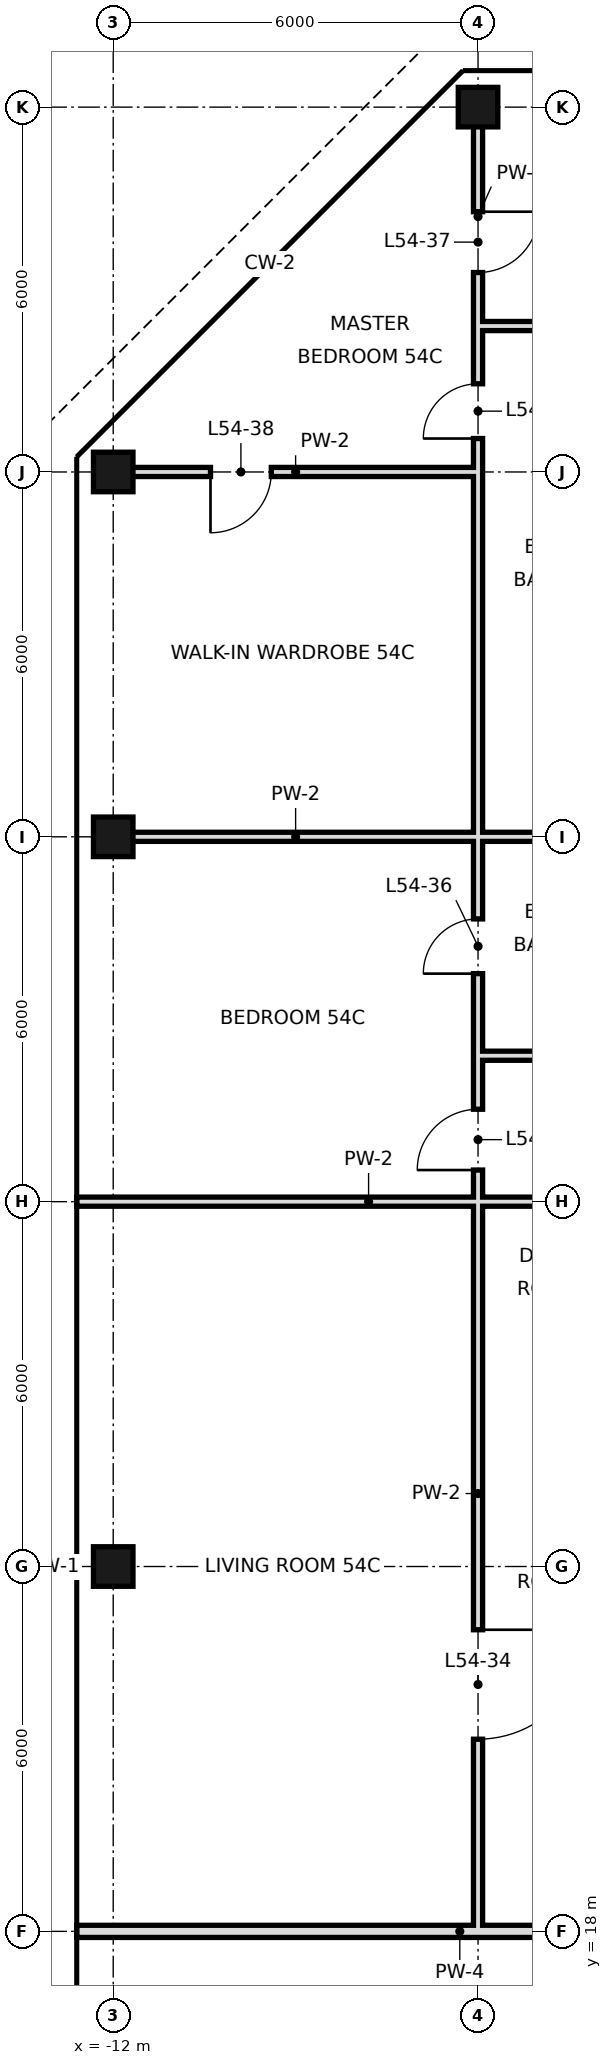
"""IFC4 building model, lengths in metres.
Left out: names, types, materials, properties, quantities, classifications, styles, units other than length and angle.
Written with IfcOpenShell. Run it as: python <this file> out.ifc"""

import sys

from ifc_helpers import new_model, si_unit, direction, frame, frame_2d, origin, origin_2d, place, context, subcontext, project, spatial, rectangle, hollow_rectangle, extrude, element, fill, save


model = new_model("IFC4")
c1 = context("Model", 3, precision=1e-05, world=origin(), true_north=direction((0.0, 1.0)))
c2 = subcontext(c1, "Body", "Model", "MODEL_VIEW")
j1 = project(units=[si_unit("LENGTHUNIT", "METRE"), si_unit("PLANEANGLEUNIT", "RADIAN")], contexts=[c1])
p1 = place(None, origin())
s1 = spatial("IfcSite", under=j1, at=p1, CompositionType="ELEMENT")
p2 = place(p1, origin())
s2 = spatial("IfcBuilding", under=s1, at=p2, CompositionType="ELEMENT")
p3 = place(p2, frame((0.0, 0.0, 229.8)))
s3 = spatial("IfcBuildingStorey", under=s2, at=p3, CompositionType="ELEMENT", Elevation=229.8)
for number, where, z_axis, x_axis in (
    (1, (-12.0, 24.0, 0.0), (0.0, 0.0, 1.0), (1.0, 0.0, 0.0)),
    (2, (-12.0, 36.0, 0.0), (0.0, 0.0, 1.0), (1.0, 0.0, 0.0)),
    (3, (-12.0, 42.0, 0.0), (0.0, 0.0, 1.0), (1.0, 0.0, 0.0)),
    (4, (-6.0, 48.0, 0.0), (0.0, 0.0, 1.0), (1.0, 0.0, 0.0)),
):
    element("IfcColumn", number, at=place(p3, frame(where, z_axis=z_axis, x_axis=x_axis)), inside=s3, PredefinedType="COLUMN", context=c2, shape_type="SweptSolid", body=[
        extrude(hollow_rectangle(XDim=0.65, YDim=0.65, WallThickness=0.032, at=origin_2d()), origin(), (0.0, 0.0, 1.0), 4.4),
    ])
p4 = place(p3, frame((-6.0, 18.0, 0.0), z_axis=(0.0, 0.0, 1.0), x_axis=(0.0, 1.0, 0.0)))
e5 = element("IfcWall", 5, at=p4, inside=s3, PredefinedType="PARTITIONING", context=c2, shape_type="SweptSolid", body=[
    extrude(rectangle(XDim=14.4, YDim=0.15, at=frame_2d((7.2, 0.0))), origin(), (0.0, 0.0, 1.0), 4.1),
])
p5 = place(p4, frame((3.16, 0.0, 0.0)))
e6 = element("IfcOpeningElement", 6, at=p5, cuts=e5, PredefinedType="OPENING", context=c2, shape_type="SweptSolid", body=[
    extrude(rectangle(XDim=1.8, YDim=2.4, at=frame_2d((0.9, 1.2))), frame((0.0, 0.085, 0.0), z_axis=(0.0, -1.0, 0.0), x_axis=(1.0, 0.0, 0.0)), (0.0, 0.0, 1.0), 0.17),
])
p6 = place(p4, frame((12.52, 0.0, 0.0)))
e7 = element("IfcOpeningElement", 7, at=p6, cuts=e5, PredefinedType="OPENING", context=c2, shape_type="SweptSolid", body=[
    extrude(rectangle(XDim=1.0, YDim=2.4, at=frame_2d((0.5, 1.2))), frame((0.0, 0.085, 0.0), z_axis=(0.0, -1.0, 0.0), x_axis=(1.0, 0.0, 0.0)), (0.0, 0.0, 1.0), 0.17),
])
p7 = place(p3, frame((-6.0, 44.4, 0.0), z_axis=(0.0, 0.0, 1.0), x_axis=(0.0, 1.0, 0.0)))
e8 = element("IfcWall", 8, at=p7, inside=s3, PredefinedType="PARTITIONING", context=c2, shape_type="SweptSolid", body=[
    extrude(rectangle(XDim=3.6, YDim=0.15, at=frame_2d((1.8, 0.0))), origin(), (0.0, 0.0, 1.0), 4.1),
])
p8 = place(p7, frame((0.88, 0.0, 0.0)))
e9 = element("IfcOpeningElement", 9, at=p8, cuts=e8, PredefinedType="OPENING", context=c2, shape_type="SweptSolid", body=[
    extrude(rectangle(XDim=1.0, YDim=2.4, at=frame_2d((0.5, 1.2))), frame((0.0, 0.085, 0.0), z_axis=(0.0, -1.0, 0.0), x_axis=(1.0, 0.0, 0.0)), (0.0, 0.0, 1.0), 0.17),
])
p9 = place(p3, frame((-6.0, 32.4, 0.0), z_axis=(0.0, 0.0, 1.0), x_axis=(0.0, 1.0, 0.0)))
e10 = element("IfcWall", 10, at=p9, inside=s3, PredefinedType="PARTITIONING", context=c2, shape_type="SweptSolid", body=[
    extrude(rectangle(XDim=12.0, YDim=0.15, at=frame_2d((6.0, 0.0))), origin(), (0.0, 0.0, 1.0), 4.1),
])
p10 = place(p9, frame((1.35, 0.0, 0.0)))
e11 = element("IfcOpeningElement", 11, at=p10, cuts=e10, PredefinedType="OPENING", context=c2, shape_type="SweptSolid", body=[
    extrude(rectangle(XDim=0.9, YDim=2.4, at=frame_2d((0.45, 1.2))), frame((0.0, 0.085, 0.0), z_axis=(0.0, -1.0, 0.0), x_axis=(1.0, 0.0, 0.0)), (0.0, 0.0, 1.0), 0.17),
])
p11 = place(p9, frame((10.15, 0.0, 0.0)))
e12 = element("IfcOpeningElement", 12, at=p11, cuts=e10, PredefinedType="OPENING", context=c2, shape_type="SweptSolid", body=[
    extrude(rectangle(XDim=0.9, YDim=2.4, at=frame_2d((0.45, 1.2))), frame((0.0, 0.085, 0.0), z_axis=(0.0, -1.0, 0.0), x_axis=(1.0, 0.0, 0.0)), (0.0, 0.0, 1.0), 0.17),
])
p12 = place(p3, frame((-12.6, 18.0, 0.0), z_axis=(0.0, 0.0, 1.0), x_axis=(1.0, 0.0, 0.0)))
e13 = element("IfcWall", 13, at=p12, inside=s3, PredefinedType="SOLIDWALL", context=c2, shape_type="SweptSolid", body=[
    extrude(rectangle(XDim=12.6, YDim=0.2, at=frame_2d((6.3, 0.0))), origin(), (0.0, 0.0, 1.0), 3.4),
])
p13 = place(p3, frame((-12.6, 30.0, 0.0), z_axis=(0.0, 0.0, 1.0), x_axis=(1.0, 0.0, 0.0)))
e14 = element("IfcWall", 14, at=p13, inside=s3, PredefinedType="PARTITIONING", context=c2, shape_type="SweptSolid", body=[
    extrude(rectangle(XDim=9.6, YDim=0.15, at=frame_2d((4.8, 0.0))), origin(), (0.0, 0.0, 1.0), 3.4),
])
p14 = place(p3, frame((-6.0, 32.4, 0.0), z_axis=(0.0, 0.0, 1.0), x_axis=(1.0, 0.0, 0.0)))
e15 = element("IfcWall", 15, at=p14, inside=s3, PredefinedType="PARTITIONING", context=c2, shape_type="SweptSolid", body=[
    extrude(rectangle(XDim=3.0, YDim=0.15, at=frame_2d((1.5, 0.0))), origin(), (0.0, 0.0, 1.0), 4.1),
])
p15 = place(p3, frame((-12.0, 36.0, 0.0), z_axis=(0.0, 0.0, 1.0), x_axis=(1.0, 0.0, 0.0)))
e16 = element("IfcWall", 16, at=p15, inside=s3, PredefinedType="PARTITIONING", context=c2, shape_type="SweptSolid", body=[
    extrude(rectangle(XDim=6.0, YDim=0.15, at=frame_2d((3.0, 0.0))), origin(), (0.0, 0.0, 1.0), 3.4),
])
p16 = place(p3, frame((-6.0, 36.0, 0.0), z_axis=(0.0, 0.0, 1.0), x_axis=(1.0, 0.0, 0.0)))
e17 = element("IfcWall", 17, at=p16, inside=s3, PredefinedType="PARTITIONING", context=c2, shape_type="SweptSolid", body=[
    extrude(rectangle(XDim=3.0, YDim=0.15, at=frame_2d((1.5, 0.0))), origin(), (0.0, 0.0, 1.0), 3.4),
])
p17 = place(p3, frame((-12.0, 42.0, 0.0), z_axis=(0.0, 0.0, 1.0), x_axis=(1.0, 0.0, 0.0)))
e18 = element("IfcWall", 18, at=p17, inside=s3, PredefinedType="PARTITIONING", context=c2, shape_type="SweptSolid", body=[
    extrude(rectangle(XDim=6.0, YDim=0.15, at=frame_2d((3.0, 0.0))), origin(), (0.0, 0.0, 1.0), 3.4),
])
p18 = place(p17, frame((1.6, 0.0, 0.0)))
e19 = element("IfcOpeningElement", 19, at=p18, cuts=e18, PredefinedType="OPENING", context=c2, shape_type="SweptSolid", body=[
    extrude(rectangle(XDim=1.0, YDim=2.4, at=frame_2d((0.5, 1.2))), frame((0.0, 0.085, 0.0), z_axis=(0.0, -1.0, 0.0), x_axis=(1.0, 0.0, 0.0)), (0.0, 0.0, 1.0), 0.17),
])
p19 = place(p3, frame((-6.0, 44.4, 0.0), z_axis=(0.0, 0.0, 1.0), x_axis=(1.0, 0.0, 0.0)))
e20 = element("IfcWall", 20, at=p19, inside=s3, PredefinedType="PARTITIONING", context=c2, shape_type="SweptSolid", body=[
    extrude(rectangle(XDim=3.0, YDim=0.15, at=frame_2d((1.5, 0.0))), origin(), (0.0, 0.0, 1.0), 4.1),
])
p20 = place(p5, origin())
e21 = element("IfcDoor", 21, at=p20, inside=s3, OperationType="SINGLE_SWING_RIGHT", PredefinedType="DOOR", context=c2, shape_type="SweptSolid", body=[
    extrude(rectangle(XDim=1.8, YDim=2.4, at=frame_2d((0.9, 1.2))), frame((0.0, 0.025, 0.0), z_axis=(0.0, -1.0, 0.0), x_axis=(1.0, 0.0, 0.0)), (0.0, 0.0, 1.0), 0.05),
])
fill(e6, e21)
p21 = place(p6, origin())
e22 = element("IfcDoor", 22, at=p21, inside=s3, OperationType="SINGLE_SWING_LEFT", PredefinedType="DOOR", context=c2, shape_type="SweptSolid", body=[
    extrude(rectangle(XDim=1.0, YDim=2.4, at=frame_2d((0.5, 1.2))), frame((0.0, 0.025, 0.0), z_axis=(0.0, -1.0, 0.0), x_axis=(1.0, 0.0, 0.0)), (0.0, 0.0, 1.0), 0.05),
])
fill(e7, e22)
p22 = place(p10, origin())
e23 = element("IfcDoor", 23, at=p22, inside=s3, OperationType="SINGLE_SWING_LEFT", PredefinedType="DOOR", context=c2, shape_type="SweptSolid", body=[
    extrude(rectangle(XDim=0.9, YDim=2.4, at=frame_2d((0.45, 1.2))), frame((0.0, 0.025, 0.0), z_axis=(0.0, -1.0, 0.0), x_axis=(1.0, 0.0, 0.0)), (0.0, 0.0, 1.0), 0.05),
])
fill(e11, e23)
p23 = place(p8, origin())
e24 = element("IfcDoor", 24, at=p23, inside=s3, OperationType="SINGLE_SWING_RIGHT", PredefinedType="DOOR", context=c2, shape_type="SweptSolid", body=[
    extrude(rectangle(XDim=1.0, YDim=2.4, at=frame_2d((0.5, 1.2))), frame((0.0, 0.025, 0.0), z_axis=(0.0, -1.0, 0.0), x_axis=(1.0, 0.0, 0.0)), (0.0, 0.0, 1.0), 0.05),
])
fill(e9, e24)
p24 = place(p18, frame((1.0, 0.0, 0.0), z_axis=(0.0, 0.0, 1.0), x_axis=(-1.0, 0.0, 0.0)))
e25 = element("IfcDoor", 25, at=p24, inside=s3, OperationType="SINGLE_SWING_RIGHT", PredefinedType="DOOR", context=c2, shape_type="SweptSolid", body=[
    extrude(rectangle(XDim=1.0, YDim=2.4, at=frame_2d((0.5, 1.2))), frame((0.0, 0.025, 0.0), z_axis=(0.0, -1.0, 0.0), x_axis=(1.0, 0.0, 0.0)), (0.0, 0.0, 1.0), 0.05),
])
fill(e19, e25)
p25 = place(p11, origin())
e26 = element("IfcDoor", 26, at=p25, inside=s3, OperationType="SINGLE_SWING_LEFT", PredefinedType="DOOR", context=c2, shape_type="SweptSolid", body=[
    extrude(rectangle(XDim=0.9, YDim=2.4, at=frame_2d((0.45, 1.2))), frame((0.0, 0.025, 0.0), z_axis=(0.0, -1.0, 0.0), x_axis=(1.0, 0.0, 0.0)), (0.0, 0.0, 1.0), 0.05),
])
fill(e12, e26)
save(model, sys.argv[1])
